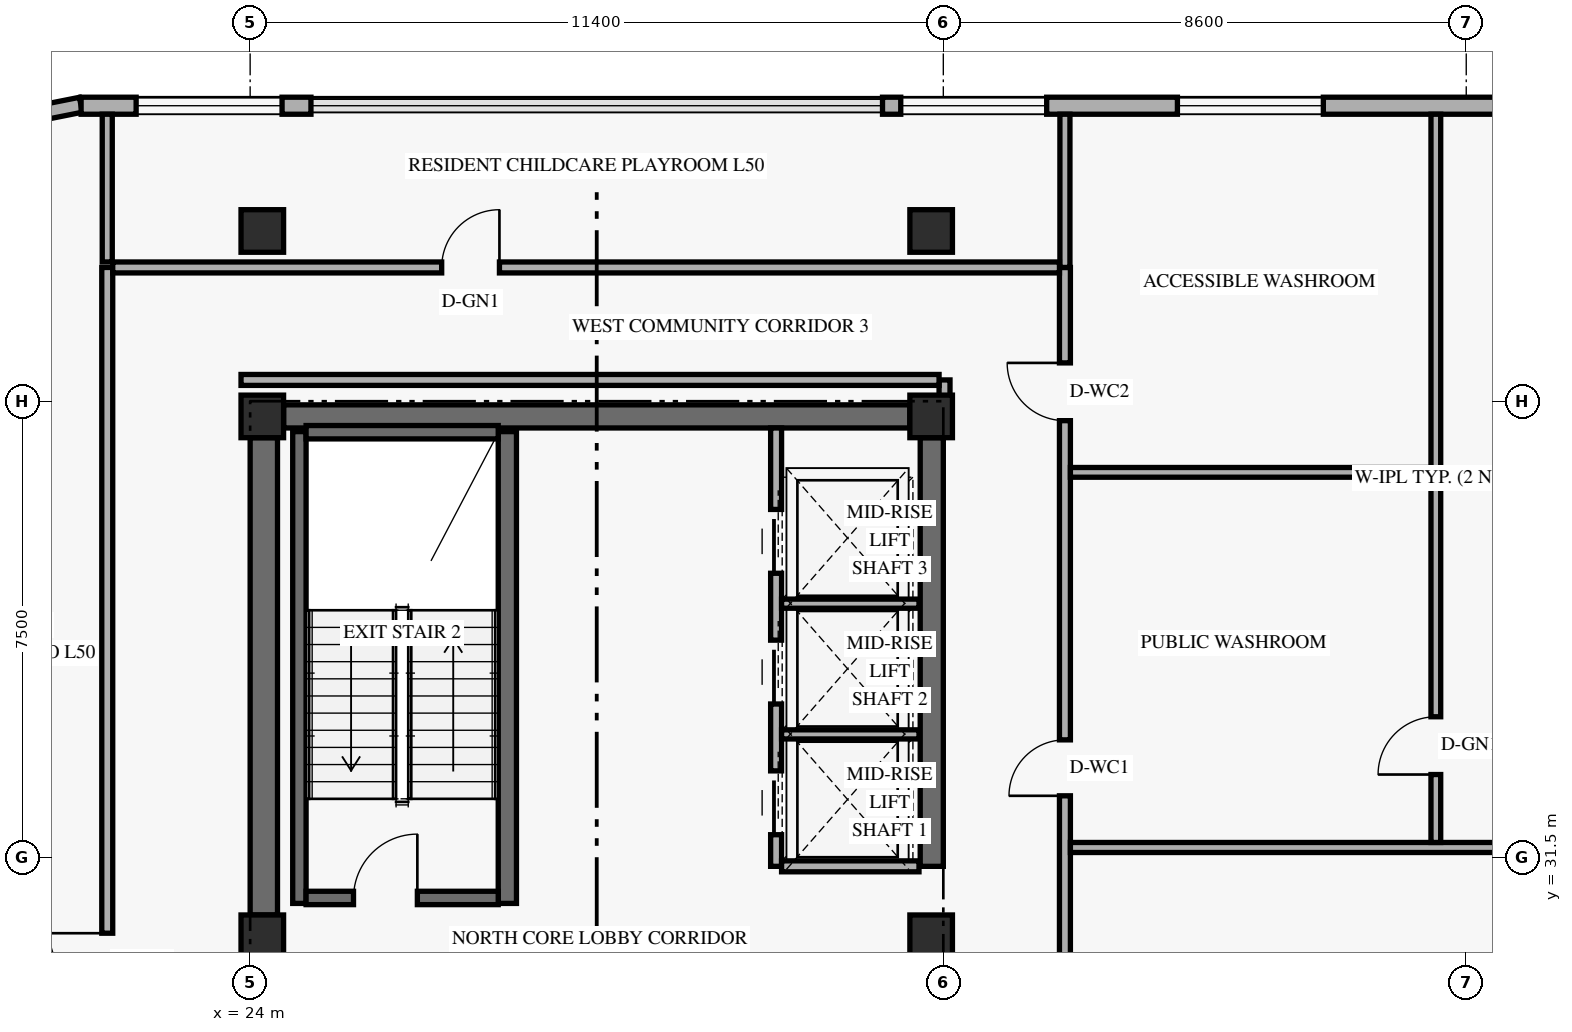
"""IFC4 building model, lengths in metres.
Left out: names, types, materials, properties, quantities, classifications, styles, units other than length and angle.
Written with IfcOpenShell. Run it as: python <this file> out.ifc"""

import sys

from ifc_helpers import new_model, si_unit, direction, frame, frame_2d, origin, origin_2d, place, context, subcontext, project, spatial, rectangle, extrude, element, fill, save


model = new_model("IFC4")
c1 = context("Model", 3, precision=1e-05, world=origin(), true_north=direction((0.0, 1.0)))
c2 = subcontext(c1, "Body", "Model", "MODEL_VIEW")
j1 = project(units=[si_unit("LENGTHUNIT", "METRE"), si_unit("PLANEANGLEUNIT", "RADIAN")], contexts=[c1])
p1 = place(None, origin())
s1 = spatial("IfcSite", under=j1, at=p1, CompositionType="ELEMENT")
p2 = place(p1, origin())
s2 = spatial("IfcBuilding", under=s1, at=p2, CompositionType="ELEMENT")
p3 = place(p2, frame((0.0, 0.0, 192.0)))
s3 = spatial("IfcBuildingStorey", under=s2, at=p3, CompositionType="ELEMENT", Elevation=192.0)
p4 = place(p3, frame((24.225, 30.55, 0.0), z_axis=(0.0, 0.0, 1.0), x_axis=(0.0, 1.0, 0.0)))
e1 = element("IfcWall", 1, at=p4, inside=s3, PredefinedType="SHEAR", context=c2, shape_type="SweptSolid", body=[
    extrude(rectangle(XDim=7.85, YDim=0.45, at=frame_2d((3.925, 0.0))), origin(), (0.0, 0.0, 1.0), 3.348),
])
p5 = place(p3, frame((35.21, 31.35, 0.0), z_axis=(0.0, 0.0, 1.0), x_axis=(0.0, 1.0, 0.0)))
e2 = element("IfcWall", 2, at=p5, inside=s3, PredefinedType="SHEAR", context=c2, shape_type="SweptSolid", body=[
    extrude(rectangle(XDim=7.05, YDim=0.38, at=frame_2d((3.525, 0.0))), origin(), (0.0, 0.0, 1.0), 3.348),
])
p6 = place(p3, frame((24.55, 38.75, 0.0), z_axis=(0.0, 0.0, 1.0), x_axis=(1.0, 0.0, 0.0)))
e3 = element("IfcWall", 3, at=p6, inside=s3, PredefinedType="SHEAR", context=c2, shape_type="SweptSolid", body=[
    extrude(rectangle(XDim=10.3, YDim=0.38, at=frame_2d((5.15, 0.0))), origin(), (0.0, 0.0, 1.0), 3.96),
])
p7 = place(p3, frame((24.81, 30.74, 0.0), z_axis=(0.0, 0.0, 1.0), x_axis=(0.0, 1.0, 0.0)))
e4 = element("IfcWall", 4, at=p7, inside=s3, PredefinedType="SHEAR", context=c2, shape_type="SweptSolid", body=[
    extrude(rectangle(XDim=7.76, YDim=0.22, at=frame_2d((3.88, 0.0))), origin(), (0.0, 0.0, 1.0), 3.96),
])
p8 = place(p3, frame((28.23, 30.74, 0.0), z_axis=(0.0, 0.0, 1.0), x_axis=(0.0, 1.0, 0.0)))
e5 = element("IfcWall", 5, at=p8, inside=s3, PredefinedType="SHEAR", context=c2, shape_type="SweptSolid", body=[
    extrude(rectangle(XDim=7.76, YDim=0.3, at=frame_2d((3.88, 0.0))), origin(), (0.0, 0.0, 1.0), 3.96),
])
p9 = place(p3, frame((24.92, 30.83, 0.0), z_axis=(0.0, 0.0, 1.0), x_axis=(1.0, 0.0, 0.0)))
e6 = element("IfcWall", 6, at=p9, inside=s3, PredefinedType="SHEAR", context=c2, shape_type="SweptSolid", body=[
    extrude(rectangle(XDim=3.16, YDim=0.22, at=frame_2d((1.58, 0.0))), origin(), (0.0, 0.0, 1.0), 3.96),
])
p10 = place(p9, frame((0.78, 0.0, 0.0)))
e7 = element("IfcOpeningElement", 7, at=p10, cuts=e6, PredefinedType="OPENING", context=c2, shape_type="SweptSolid", body=[
    extrude(rectangle(XDim=1.05, YDim=2.15, at=frame_2d((0.525, 1.075))), frame((0.0, 0.12, 0.0), z_axis=(0.0, -1.0, 0.0), x_axis=(1.0, 0.0, 0.0)), (0.0, 0.0, 1.0), 0.24),
])
p11 = place(p3, frame((24.92, 38.49, 0.0), z_axis=(0.0, 0.0, 1.0), x_axis=(1.0, 0.0, 0.0)))
e8 = element("IfcWall", 8, at=p11, inside=s3, PredefinedType="SHEAR", context=c2, shape_type="SweptSolid", body=[
    extrude(rectangle(XDim=3.16, YDim=0.22, at=frame_2d((1.58, 0.0))), origin(), (0.0, 0.0, 1.0), 3.96),
])
for number, where, z_axis, x_axis in (
    (9, (24.2, 30.2, 0.0), (0.0, 0.0, 1.0), (1.0, 0.0, 0.0)),
    (10, (24.2, 38.75, 0.0), (0.0, 0.0, 1.0), (1.0, 0.0, 0.0)),
    (11, (24.2, 41.8, 0.0), (0.0, 0.0, 1.0), (1.0, 0.0, 0.0)),
    (12, (35.2, 30.2, 0.0), (0.0, 0.0, 1.0), (1.0, 0.0, 0.0)),
    (13, (35.2, 38.75, 0.0), (0.0, 0.0, 1.0), (1.0, 0.0, 0.0)),
    (14, (35.2, 41.8, 0.0), (0.0, 0.0, 1.0), (1.0, 0.0, 0.0)),
):
    element("IfcColumn", number, at=place(p3, frame(where, z_axis=z_axis, x_axis=x_axis)), inside=s3, PredefinedType="COLUMN", context=c2, shape_type="SweptSolid", body=[
        extrude(rectangle(XDim=0.7, YDim=0.7, at=origin_2d()), origin(), (0.0, 0.0, 1.0), 4.2),
    ])
p12 = place(p3, frame((21.217, 43.876, 0.0), z_axis=(0.0, 0.0, 1.0), x_axis=(-0.980809899341, -0.19496651342, 0.0)))
e15 = element("IfcWall", 15, at=p12, inside=s3, PredefinedType="SOLIDWALL", context=c2, shape_type="SweptSolid", body=[
    extrude(rectangle(XDim=1.389, YDim=0.25, at=frame_2d((0.694, 0.0))), origin(), (0.0, 0.0, 1.0), 3.96),
])
p13 = place(p3, frame((54.98, 43.86, 0.0), z_axis=(0.0, 0.0, 1.0), x_axis=(-1.0, 0.0, 0.0)))
e16 = element("IfcWall", 16, at=p13, inside=s3, PredefinedType="SOLIDWALL", context=c2, shape_type="SweptSolid", body=[
    extrude(rectangle(XDim=20.58, YDim=0.28, at=frame_2d((10.29, 0.0))), origin(), (0.0, 0.0, 1.0), 3.96),
])
p14 = place(p13, frame((17.88, 0.0, 0.85)))
e17 = element("IfcOpeningElement", 17, at=p14, cuts=e16, PredefinedType="OPENING", context=c2, shape_type="SweptSolid", body=[
    extrude(rectangle(XDim=2.4, YDim=1.9, at=frame_2d((1.2, 0.95))), frame((0.0, 0.15, 0.0), z_axis=(0.0, -1.0, 0.0), x_axis=(1.0, 0.0, 0.0)), (0.0, 0.0, 1.0), 0.3),
])
p15 = place(p13, frame((13.33, 0.0, 0.85)))
e18 = element("IfcOpeningElement", 18, at=p15, cuts=e16, PredefinedType="OPENING", context=c2, shape_type="SweptSolid", body=[
    extrude(rectangle(XDim=2.4, YDim=1.9, at=frame_2d((1.2, 0.95))), frame((0.0, 0.15, 0.0), z_axis=(0.0, -1.0, 0.0), x_axis=(1.0, 0.0, 0.0)), (0.0, 0.0, 1.0), 0.3),
])
p16 = place(p13, frame((4.54, 0.0, 0.85)))
e19 = element("IfcOpeningElement", 19, at=p16, cuts=e16, PredefinedType="OPENING", context=c2, shape_type="SweptSolid", body=[
    extrude(rectangle(XDim=2.4, YDim=1.9, at=frame_2d((1.2, 0.95))), frame((0.0, 0.15, 0.0), z_axis=(0.0, -1.0, 0.0), x_axis=(1.0, 0.0, 0.0)), (0.0, 0.0, 1.0), 0.3),
])
p17 = place(p3, frame((25.0, 43.86, 0.0), z_axis=(0.0, 0.0, 1.0), x_axis=(-1.0, 0.0, 0.0)))
e20 = element("IfcWall", 20, at=p17, inside=s3, PredefinedType="SOLIDWALL", context=c2, shape_type="SweptSolid", body=[
    extrude(rectangle(XDim=3.78, YDim=0.28, at=frame_2d((1.89, 0.0))), origin(), (0.0, 0.0, 1.0), 3.96),
])
p18 = place(p17, frame((0.475, 0.0, 0.85)))
e21 = element("IfcOpeningElement", 21, at=p18, cuts=e20, PredefinedType="OPENING", context=c2, shape_type="SweptSolid", body=[
    extrude(rectangle(XDim=2.4, YDim=1.9, at=frame_2d((1.2, 0.95))), frame((0.0, 0.15, 0.0), z_axis=(0.0, -1.0, 0.0), x_axis=(1.0, 0.0, 0.0)), (0.0, 0.0, 1.0), 0.3),
])
p19 = place(p3, frame((32.65, 31.35, 0.0), z_axis=(0.0, 0.0, 1.0), x_axis=(0.0, 1.0, 0.0)))
e22 = element("IfcWall", 22, at=p19, inside=s3, PredefinedType="STANDARD", context=c2, shape_type="SweptSolid", body=[
    extrude(rectangle(XDim=7.21, YDim=0.18, at=frame_2d((3.605, 0.0))), origin(), (0.0, 0.0, 1.0), 3.96),
])
p20 = place(p19, frame((0.52, 0.0, 0.0)))
e23 = element("IfcOpeningElement", 23, at=p20, cuts=e22, PredefinedType="OPENING", context=c2, shape_type="SweptSolid", body=[
    extrude(rectangle(XDim=1.05, YDim=2.2, at=frame_2d((0.525, 1.1))), frame((0.0, 0.1, 0.0), z_axis=(0.0, -1.0, 0.0), x_axis=(1.0, 0.0, 0.0)), (0.0, 0.0, 1.0), 0.2),
])
p21 = place(p19, frame((2.67, 0.0, 0.0)))
e24 = element("IfcOpeningElement", 24, at=p21, cuts=e22, PredefinedType="OPENING", context=c2, shape_type="SweptSolid", body=[
    extrude(rectangle(XDim=1.05, YDim=2.2, at=frame_2d((0.525, 1.1))), frame((0.0, 0.1, 0.0), z_axis=(0.0, -1.0, 0.0), x_axis=(1.0, 0.0, 0.0)), (0.0, 0.0, 1.0), 0.2),
])
p22 = place(p19, frame((4.82, 0.0, 0.0)))
e25 = element("IfcOpeningElement", 25, at=p22, cuts=e22, PredefinedType="OPENING", context=c2, shape_type="SweptSolid", body=[
    extrude(rectangle(XDim=1.05, YDim=2.2, at=frame_2d((0.525, 1.1))), frame((0.0, 0.1, 0.0), z_axis=(0.0, -1.0, 0.0), x_axis=(1.0, 0.0, 0.0)), (0.0, 0.0, 1.0), 0.2),
])
p23 = place(p3, frame((32.74, 31.35, 0.0), z_axis=(0.0, 0.0, 1.0), x_axis=(1.0, 0.0, 0.0)))
e26 = element("IfcWall", 26, at=p23, inside=s3, PredefinedType="STANDARD", context=c2, shape_type="SweptSolid", body=[
    extrude(rectangle(XDim=2.26, YDim=0.18, at=frame_2d((1.13, 0.0))), origin(), (0.0, 0.0, 1.0), 3.96),
])
for number, where, z_axis, x_axis in (
    (27, (32.74, 33.52, 0.0), (0.0, 0.0, 1.0), (1.0, 0.0, 0.0)),
    (28, (32.74, 35.67, 0.0), (0.0, 0.0, 1.0), (1.0, 0.0, 0.0)),
):
    element("IfcWall", number, at=place(p3, frame(where, z_axis=z_axis, x_axis=x_axis)), inside=s3, PredefinedType="STANDARD", context=c2, shape_type="SweptSolid", body=[
        extrude(rectangle(XDim=2.26, YDim=0.15, at=frame_2d((1.13, 0.0))), origin(), (0.0, 0.0, 1.0), 3.96),
    ])
p24 = place(p3, frame((37.4, 6.8, 0.0), z_axis=(0.0, 0.0, 1.0), x_axis=(0.0, 1.0, 0.0)))
e29 = element("IfcWall", 29, at=p24, inside=s3, PredefinedType="STANDARD", context=c2, shape_type="SweptSolid", body=[
    extrude(rectangle(XDim=34.4, YDim=0.18, at=frame_2d((17.2, 0.0))), origin(), (0.0, 0.0, 1.0), 3.33),
])
p25 = place(p24, frame((25.71, 0.0, 0.0)))
e30 = element("IfcOpeningElement", 30, at=p25, cuts=e29, PredefinedType="OPENING", context=c2, shape_type="SweptSolid", body=[
    extrude(rectangle(XDim=0.92, YDim=2.14, at=frame_2d((0.46, 1.07))), frame((0.0, 0.1, 0.0), z_axis=(0.0, -1.0, 0.0), x_axis=(1.0, 0.0, 0.0)), (0.0, 0.0, 1.0), 0.2),
])
p26 = place(p24, frame((31.88, 0.0, 0.0)))
e31 = element("IfcOpeningElement", 31, at=p26, cuts=e29, PredefinedType="OPENING", context=c2, shape_type="SweptSolid", body=[
    extrude(rectangle(XDim=0.95, YDim=2.14, at=frame_2d((0.475, 1.07))), frame((0.0, 0.1, 0.0), z_axis=(0.0, -1.0, 0.0), x_axis=(1.0, 0.0, 0.0)), (0.0, 0.0, 1.0), 0.2),
])
p27 = place(p24, frame((2.8, 0.0, 0.0)))
e32 = element("IfcOpeningElement", 32, at=p27, cuts=e29, PredefinedType="OPENING", context=c2, shape_type="SweptSolid", body=[
    extrude(rectangle(XDim=1.15, YDim=2.15, at=frame_2d((0.575, 1.075))), frame((0.0, 0.1, 0.0), z_axis=(0.0, -1.0, 0.0), x_axis=(1.0, 0.0, 0.0)), (0.0, 0.0, 1.0), 0.2),
])
p28 = place(p24, frame((21.6, 0.0, 0.0)))
e33 = element("IfcOpeningElement", 33, at=p28, cuts=e29, PredefinedType="OPENING", context=c2, shape_type="SweptSolid", body=[
    extrude(rectangle(XDim=1.15, YDim=2.15, at=frame_2d((0.575, 1.075))), frame((0.0, 0.1, 0.0), z_axis=(0.0, -1.0, 0.0), x_axis=(1.0, 0.0, 0.0)), (0.0, 0.0, 1.0), 0.2),
])
p29 = place(p3, frame((37.4, 41.2, 0.0), z_axis=(0.0, 0.0, 1.0), x_axis=(0.0, 1.0, 0.0)))
e34 = element("IfcWall", 34, at=p29, inside=s3, PredefinedType="PARTITIONING", context=c2, shape_type="SweptSolid", body=[
    extrude(rectangle(XDim=2.52, YDim=0.165, at=frame_2d((1.26, 0.0))), origin(), (0.0, 0.0, 1.0), 3.479),
])
p30 = place(p3, frame((35.42, 38.75, 0.0), z_axis=(0.0, 0.0, 1.0), x_axis=(0.0, 1.0, 0.0)))
e35 = element("IfcWall", 35, at=p30, inside=s3, PredefinedType="STANDARD", context=c2, shape_type="SweptSolid", body=[
    extrude(rectangle(XDim=0.6, YDim=0.18, at=frame_2d((0.3, 0.0))), origin(), (0.0, 0.0, 1.0), 3.33),
])
p31 = place(p3, frame((37.49, 31.66, 0.0), z_axis=(0.0, 0.0, 1.0), x_axis=(1.0, 0.0, 0.0)))
e36 = element("IfcWall", 36, at=p31, inside=s3, PredefinedType="PARTITIONING", context=c2, shape_type="SweptSolid", body=[
    extrude(rectangle(XDim=20.83, YDim=0.165, at=frame_2d((10.415, 0.0))), origin(), (0.0, 0.0, 1.0), 3.33),
])
p32 = place(p3, frame((43.5, 31.742, 0.0), z_axis=(0.0, 0.0, 1.0), x_axis=(0.0, 1.0, 0.0)))
e37 = element("IfcWall", 37, at=p32, inside=s3, PredefinedType="PLUMBINGWALL", context=c2, shape_type="SweptSolid", body=[
    extrude(rectangle(XDim=11.978, YDim=0.16, at=frame_2d((5.989, 0.0))), origin(), (0.0, 0.0, 1.0), 3.33),
])
p33 = place(p32, frame((1.117, 0.0, 0.0)))
e38 = element("IfcOpeningElement", 38, at=p33, cuts=e37, PredefinedType="OPENING", context=c2, shape_type="SweptSolid", body=[
    extrude(rectangle(XDim=0.95, YDim=2.15, at=frame_2d((0.475, 1.075))), frame((0.0, 0.09, 0.0), z_axis=(0.0, -1.0, 0.0), x_axis=(1.0, 0.0, 0.0)), (0.0, 0.0, 1.0), 0.18),
])
p34 = place(p3, frame((37.49, 37.83, 0.0), z_axis=(0.0, 0.0, 1.0), x_axis=(1.0, 0.0, 0.0)))
e39 = element("IfcWall", 39, at=p34, inside=s3, PredefinedType="PLUMBINGWALL", context=c2, shape_type="SweptSolid", body=[
    extrude(rectangle(XDim=5.93, YDim=0.16, at=frame_2d((2.965, 0.0))), origin(), (0.0, 0.0, 1.0), 3.96),
])
p35 = place(p3, frame((21.65, 6.8, 0.0), z_axis=(0.0, 0.0, 1.0), x_axis=(0.0, 1.0, 0.0)))
e40 = element("IfcWall", 40, at=p35, inside=s3, PredefinedType="STANDARD", context=c2, shape_type="SweptSolid", body=[
    extrude(rectangle(XDim=34.4, YDim=0.18, at=frame_2d((17.2, 0.0))), origin(), (0.0, 0.0, 1.0), 3.33),
])
p36 = place(p35, frame((7.5, 0.0, 0.0)))
e41 = element("IfcOpeningElement", 41, at=p36, cuts=e40, PredefinedType="OPENING", context=c2, shape_type="SweptSolid", body=[
    extrude(rectangle(XDim=0.95, YDim=2.15, at=frame_2d((0.475, 1.075))), frame((0.0, 0.1, 0.0), z_axis=(0.0, -1.0, 0.0), x_axis=(1.0, 0.0, 0.0)), (0.0, 0.0, 1.0), 0.2),
])
p37 = place(p35, frame((22.5, 0.0, 0.0)))
e42 = element("IfcOpeningElement", 42, at=p37, cuts=e40, PredefinedType="OPENING", context=c2, shape_type="SweptSolid", body=[
    extrude(rectangle(XDim=0.95, YDim=2.15, at=frame_2d((0.475, 1.075))), frame((0.0, 0.1, 0.0), z_axis=(0.0, -1.0, 0.0), x_axis=(1.0, 0.0, 0.0)), (0.0, 0.0, 1.0), 0.2),
])
p38 = place(p3, frame((21.74, 41.2, 0.0), z_axis=(0.0, 0.0, 1.0), x_axis=(1.0, 0.0, 0.0)))
e43 = element("IfcWall", 43, at=p38, inside=s3, PredefinedType="STANDARD", context=c2, shape_type="SweptSolid", body=[
    extrude(rectangle(XDim=15.57, YDim=0.18, at=frame_2d((7.785, 0.0))), origin(), (0.0, 0.0, 1.0), 3.33),
])
p39 = place(p38, frame((5.41, 0.0, 0.0)))
e44 = element("IfcOpeningElement", 44, at=p39, cuts=e43, PredefinedType="OPENING", context=c2, shape_type="SweptSolid", body=[
    extrude(rectangle(XDim=0.95, YDim=2.15, at=frame_2d((0.475, 1.075))), frame((0.0, 0.1, 0.0), z_axis=(0.0, -1.0, 0.0), x_axis=(1.0, 0.0, 0.0)), (0.0, 0.0, 1.0), 0.2),
])
p40 = place(p3, frame((23.85, 39.35, 0.0), z_axis=(0.0, 0.0, 1.0), x_axis=(1.0, 0.0, 0.0)))
e45 = element("IfcWall", 45, at=p40, inside=s3, PredefinedType="STANDARD", context=c2, shape_type="SweptSolid", body=[
    extrude(rectangle(XDim=11.48, YDim=0.18, at=frame_2d((5.74, 0.0))), origin(), (0.0, 0.0, 1.0), 3.33),
])
p41 = place(p3, frame((21.65, 41.29, 0.0), z_axis=(0.0, 0.0, 1.0), x_axis=(0.0, 1.0, 0.0)))
e46 = element("IfcWall", 46, at=p41, inside=s3, PredefinedType="PARTITIONING", context=c2, shape_type="SweptSolid", body=[
    extrude(rectangle(XDim=2.43, YDim=0.165, at=frame_2d((1.215, 0.0))), origin(), (0.0, 0.0, 1.0), 3.479),
])
p42 = place(p14, origin())
e47 = element("IfcWindow", 47, at=p42, inside=s3, PartitioningType="SINGLE_PANEL", PredefinedType="WINDOW", context=c2, shape_type="SweptSolid", body=[
    extrude(rectangle(XDim=2.4, YDim=1.9, at=frame_2d((1.2, 0.95))), frame((0.0, 0.03, 0.0), z_axis=(0.0, -1.0, 0.0), x_axis=(1.0, 0.0, 0.0)), (0.0, 0.0, 1.0), 0.06),
])
fill(e17, e47)
p43 = place(p15, origin())
e48 = element("IfcWindow", 48, at=p43, inside=s3, PartitioningType="SINGLE_PANEL", PredefinedType="WINDOW", context=c2, shape_type="SweptSolid", body=[
    extrude(rectangle(XDim=2.4, YDim=1.9, at=frame_2d((1.2, 0.95))), frame((0.0, 0.03, 0.0), z_axis=(0.0, -1.0, 0.0), x_axis=(1.0, 0.0, 0.0)), (0.0, 0.0, 1.0), 0.06),
])
fill(e18, e48)
p44 = place(p18, origin())
e49 = element("IfcWindow", 49, at=p44, inside=s3, PartitioningType="SINGLE_PANEL", PredefinedType="WINDOW", context=c2, shape_type="SweptSolid", body=[
    extrude(rectangle(XDim=2.4, YDim=1.9, at=frame_2d((1.2, 0.95))), frame((0.0, 0.03, 0.0), z_axis=(0.0, -1.0, 0.0), x_axis=(1.0, 0.0, 0.0)), (0.0, 0.0, 1.0), 0.06),
])
fill(e21, e49)
p45 = place(p10, origin())
e50 = element("IfcDoor", 50, at=p45, inside=s3, OperationType="SINGLE_SWING_RIGHT", PredefinedType="DOOR", context=c2, shape_type="SweptSolid", body=[
    extrude(rectangle(XDim=1.05, YDim=2.15, at=frame_2d((0.525, 1.075))), frame((0.0, 0.025, 0.0), z_axis=(0.0, -1.0, 0.0), x_axis=(1.0, 0.0, 0.0)), (0.0, 0.0, 1.0), 0.05),
])
fill(e7, e50)
p46 = place(p20, origin())
e51 = element("IfcDoor", 51, at=p46, inside=s3, OperationType="SLIDING_TO_LEFT", PredefinedType="DOOR", context=c2, shape_type="SweptSolid", body=[
    extrude(rectangle(XDim=1.05, YDim=2.2, at=frame_2d((0.525, 1.1))), frame((0.0, 0.025, 0.0), z_axis=(0.0, -1.0, 0.0), x_axis=(1.0, 0.0, 0.0)), (0.0, 0.0, 1.0), 0.05),
])
fill(e23, e51)
p47 = place(p21, origin())
e52 = element("IfcDoor", 52, at=p47, inside=s3, OperationType="SLIDING_TO_LEFT", PredefinedType="DOOR", context=c2, shape_type="SweptSolid", body=[
    extrude(rectangle(XDim=1.05, YDim=2.2, at=frame_2d((0.525, 1.1))), frame((0.0, 0.025, 0.0), z_axis=(0.0, -1.0, 0.0), x_axis=(1.0, 0.0, 0.0)), (0.0, 0.0, 1.0), 0.05),
])
fill(e24, e52)
p48 = place(p22, origin())
e53 = element("IfcDoor", 53, at=p48, inside=s3, OperationType="SLIDING_TO_LEFT", PredefinedType="DOOR", context=c2, shape_type="SweptSolid", body=[
    extrude(rectangle(XDim=1.05, YDim=2.2, at=frame_2d((0.525, 1.1))), frame((0.0, 0.025, 0.0), z_axis=(0.0, -1.0, 0.0), x_axis=(1.0, 0.0, 0.0)), (0.0, 0.0, 1.0), 0.05),
])
fill(e25, e53)
p49 = place(p25, origin())
e54 = element("IfcDoor", 54, at=p49, inside=s3, OperationType="SINGLE_SWING_LEFT", PredefinedType="DOOR", context=c2, shape_type="SweptSolid", body=[
    extrude(rectangle(XDim=0.92, YDim=2.14, at=frame_2d((0.46, 1.07))), frame((0.0, 0.025, 0.0), z_axis=(0.0, -1.0, 0.0), x_axis=(1.0, 0.0, 0.0)), (0.0, 0.0, 1.0), 0.05),
])
fill(e30, e54)
p50 = place(p26, origin())
e55 = element("IfcDoor", 55, at=p50, inside=s3, OperationType="SINGLE_SWING_RIGHT", PredefinedType="DOOR", context=c2, shape_type="SweptSolid", body=[
    extrude(rectangle(XDim=0.95, YDim=2.14, at=frame_2d((0.475, 1.07))), frame((0.0, 0.025, 0.0), z_axis=(0.0, -1.0, 0.0), x_axis=(1.0, 0.0, 0.0)), (0.0, 0.0, 1.0), 0.05),
])
fill(e31, e55)
p51 = place(p33, origin())
e56 = element("IfcDoor", 56, at=p51, inside=s3, OperationType="SINGLE_SWING_LEFT", PredefinedType="DOOR", context=c2, shape_type="SweptSolid", body=[
    extrude(rectangle(XDim=0.95, YDim=2.15, at=frame_2d((0.475, 1.075))), frame((0.0, 0.025, 0.0), z_axis=(0.0, -1.0, 0.0), x_axis=(1.0, 0.0, 0.0)), (0.0, 0.0, 1.0), 0.05),
])
fill(e38, e56)
p52 = place(p37, origin())
e57 = element("IfcDoor", 57, at=p52, inside=s3, OperationType="SINGLE_SWING_RIGHT", PredefinedType="DOOR", context=c2, shape_type="SweptSolid", body=[
    extrude(rectangle(XDim=0.95, YDim=2.15, at=frame_2d((0.475, 1.075))), frame((0.0, 0.025, 0.0), z_axis=(0.0, -1.0, 0.0), x_axis=(1.0, 0.0, 0.0)), (0.0, 0.0, 1.0), 0.05),
])
fill(e42, e57)
p53 = place(p39, origin())
e58 = element("IfcDoor", 58, at=p53, inside=s3, OperationType="SINGLE_SWING_RIGHT", PredefinedType="DOOR", context=c2, shape_type="SweptSolid", body=[
    extrude(rectangle(XDim=0.95, YDim=2.15, at=frame_2d((0.475, 1.075))), frame((0.0, 0.025, 0.0), z_axis=(0.0, -1.0, 0.0), x_axis=(1.0, 0.0, 0.0)), (0.0, 0.0, 1.0), 0.05),
])
fill(e44, e58)
save(model, sys.argv[1])
